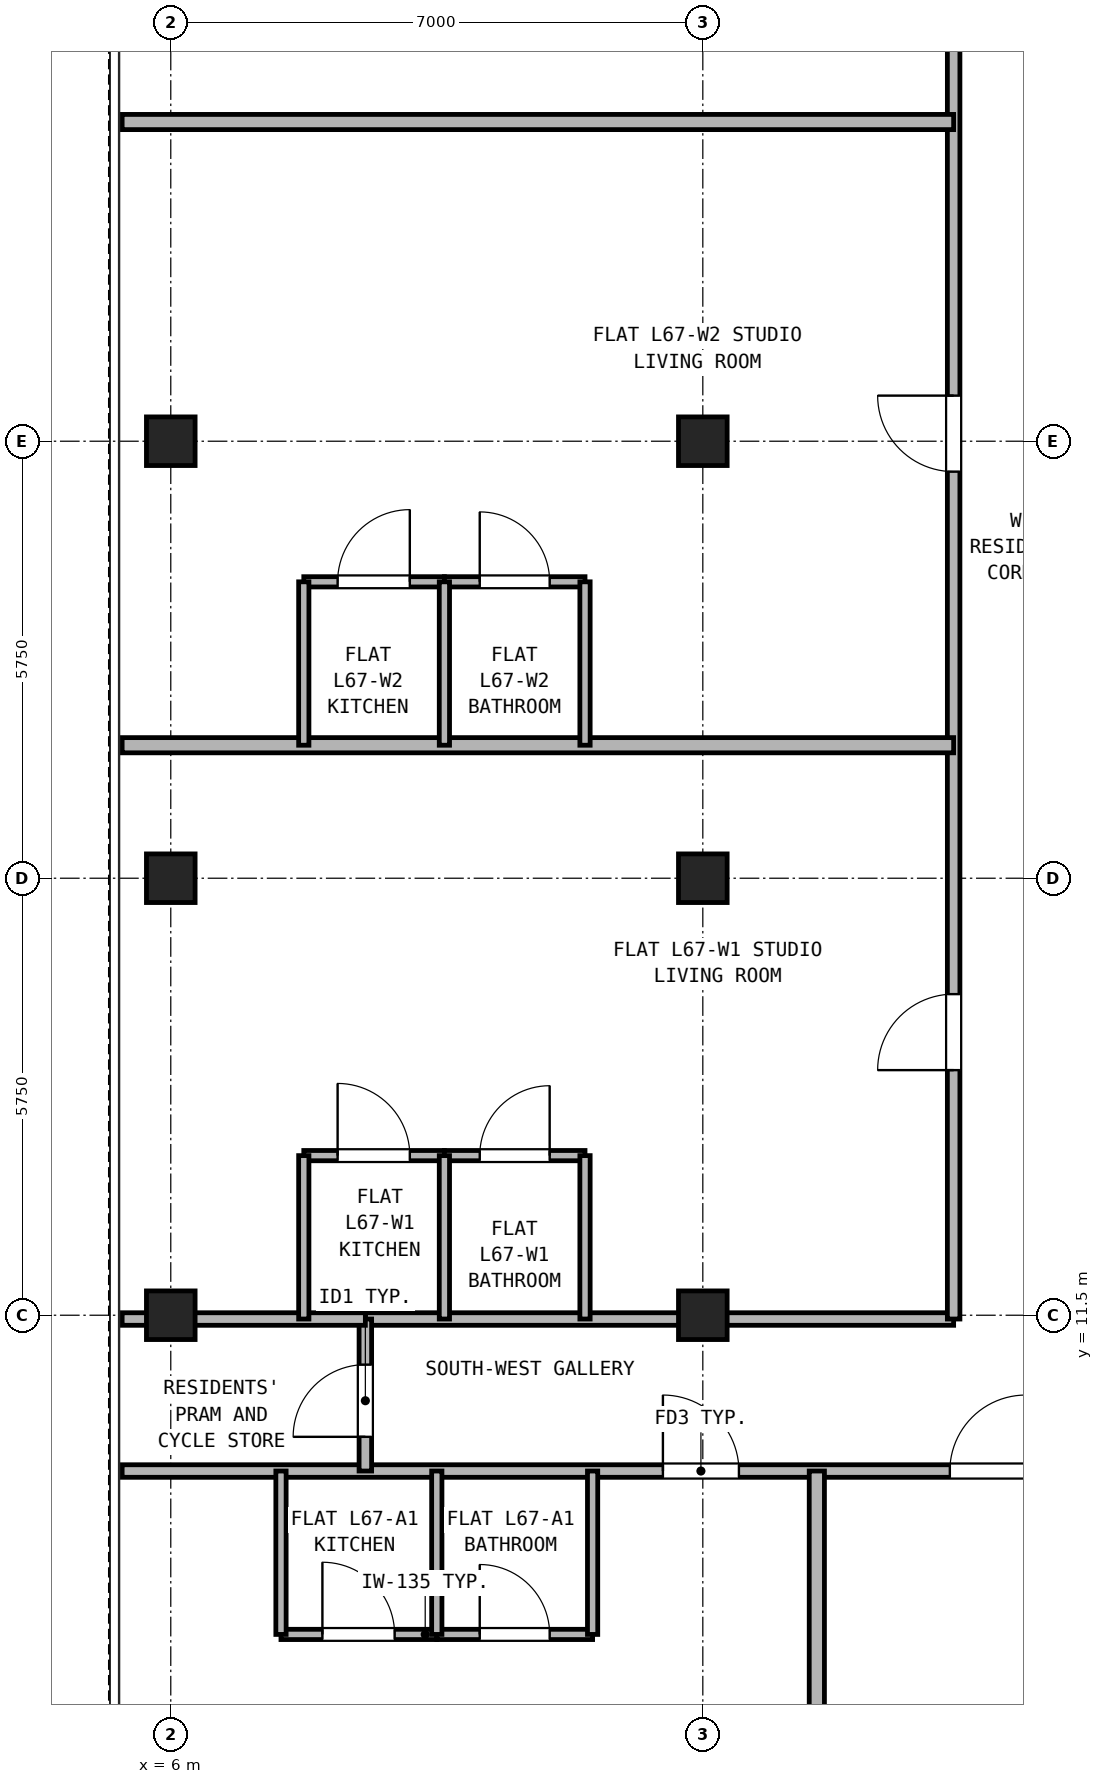
"""IFC4 building model, lengths in metres.
Left out: names, types, materials, properties, quantities, classifications, styles, units other than length and angle.
Written with IfcOpenShell. Run it as: python <this file> out.ifc"""

import sys

from ifc_helpers import new_model, si_unit, direction, frame, frame_2d, origin, origin_2d, place, context, subcontext, project, spatial, rectangle, hollow_rectangle, extrude, source, transform, mapped, element, fill, save


model = new_model("IFC4")
c1 = context("Model", 3, precision=1e-05, world=origin(), true_north=direction((0.0, 1.0)))
c2 = subcontext(c1, "Body", "Model", "MODEL_VIEW")
j1 = project(units=[si_unit("LENGTHUNIT", "METRE"), si_unit("PLANEANGLEUNIT", "RADIAN")], contexts=[c1])
p1 = place(None, origin())
s1 = spatial("IfcSite", under=j1, at=p1, CompositionType="ELEMENT")
p2 = place(p1, origin())
s2 = spatial("IfcBuilding", under=s1, at=p2, CompositionType="ELEMENT")
p3 = place(p2, frame((0.0, 0.0, 236.1)))
s3 = spatial("IfcBuildingStorey", under=s2, at=p3, CompositionType="ELEMENT", Elevation=236.1)
m1 = source(origin(), c2, "Body", "SweptSolid", [
    extrude(hollow_rectangle(XDim=0.64, YDim=0.64, WallThickness=0.035, at=origin_2d()), origin(), (0.0, 0.0, 1.0), 2.98),
])
for number, where, z_axis, x_axis in (
    (1, (6.0, 11.5, 0.0), (0.0, 0.0, 1.0), (1.0, 0.0, 0.0)),
    (2, (6.0, 17.25, 0.0), (0.0, 0.0, 1.0), (1.0, 0.0, 0.0)),
    (3, (6.0, 23.0, 0.0), (0.0, 0.0, 1.0), (1.0, 0.0, 0.0)),
    (4, (13.0, 11.5, 0.0), (0.0, 0.0, 1.0), (1.0, 0.0, 0.0)),
    (5, (13.0, 17.25, 0.0), (0.0, 0.0, 1.0), (1.0, 0.0, 0.0)),
    (6, (13.0, 23.0, 0.0), (0.0, 0.0, 1.0), (1.0, 0.0, 0.0)),
):
    element("IfcColumn", number, at=place(p3, frame(where, z_axis=z_axis, x_axis=x_axis)), inside=s3, PredefinedType="COLUMN", context=c2, shape_type="MappedRepresentation", body=[
        mapped(m1, transform((0.0, 0.0, 0.0), x_axis=(1.0, 0.0, 0.0), y_axis=(0.0, 1.0, 0.0), z_axis=(0.0, 0.0, 1.0), scale=1.0)),
    ])
p4 = place(p3, frame((5.36, 9.45, 0.0), z_axis=(0.0, 0.0, 1.0), x_axis=(1.0, 0.0, 0.0)))
e7 = element("IfcWall", 7, at=p4, inside=s3, PredefinedType="PARTITIONING", context=c2, shape_type="SweptSolid", body=[
    extrude(rectangle(XDim=36.28, YDim=0.165, at=frame_2d((18.14, 0.0))), origin(), (0.0, 0.0, 1.0), 2.98),
])
p5 = place(p4, frame((7.115, 0.0, 0.0)))
e8 = element("IfcOpeningElement", 8, at=p5, cuts=e7, PredefinedType="OPENING", context=c2, shape_type="SweptSolid", body=[
    extrude(rectangle(XDim=1.0, YDim=2.15, at=frame_2d((0.5, 1.075))), frame((0.0, 0.093, 0.0), z_axis=(0.0, -1.0, 0.0), x_axis=(1.0, 0.0, 0.0)), (0.0, 0.0, 1.0), 0.185),
])
p6 = place(p4, frame((10.89, 0.0, 0.0)))
e9 = element("IfcOpeningElement", 9, at=p6, cuts=e7, PredefinedType="OPENING", context=c2, shape_type="SweptSolid", body=[
    extrude(rectangle(XDim=1.0, YDim=2.15, at=frame_2d((0.5, 1.075))), frame((0.0, 0.093, 0.0), z_axis=(0.0, -1.0, 0.0), x_axis=(1.0, 0.0, 0.0)), (0.0, 0.0, 1.0), 0.185),
])
p7 = place(p4, frame((23.64, 0.0, 0.0)))
e10 = element("IfcOpeningElement", 10, at=p7, cuts=e7, PredefinedType="OPENING", context=c2, shape_type="SweptSolid", body=[
    extrude(rectangle(XDim=1.0, YDim=2.15, at=frame_2d((0.5, 1.075))), frame((0.0, 0.093, 0.0), z_axis=(0.0, -1.0, 0.0), x_axis=(1.0, 0.0, 0.0)), (0.0, 0.0, 1.0), 0.185),
])
p8 = place(p4, frame((27.915, 0.0, 0.0)))
e11 = element("IfcOpeningElement", 11, at=p8, cuts=e7, PredefinedType="OPENING", context=c2, shape_type="SweptSolid", body=[
    extrude(rectangle(XDim=1.0, YDim=2.15, at=frame_2d((0.5, 1.075))), frame((0.0, 0.093, 0.0), z_axis=(0.0, -1.0, 0.0), x_axis=(1.0, 0.0, 0.0)), (0.0, 0.0, 1.0), 0.185),
])
p9 = place(p3, frame((8.56, 11.45, 0.0), z_axis=(0.0, 0.0, 1.0), x_axis=(1.0, 0.0, 0.0)))
e12 = element("IfcWall", 12, at=p9, inside=s3, PredefinedType="PARTITIONING", context=c2, shape_type="SweptSolid", body=[
    extrude(rectangle(XDim=7.74, YDim=0.165, at=frame_2d((3.87, 0.0))), origin(), (0.0, 0.0, 1.0), 2.428),
])
p10 = place(p3, frame((8.56, 9.45, 0.0), z_axis=(0.0, 0.0, 1.0), x_axis=(0.0, 1.0, 0.0)))
e13 = element("IfcWall", 13, at=p10, inside=s3, PredefinedType="PARTITIONING", context=c2, shape_type="SweptSolid", body=[
    extrude(rectangle(XDim=2.0, YDim=0.165, at=frame_2d((1.0, 0.0))), origin(), (0.0, 0.0, 1.0), 2.98),
])
p11 = place(p10, frame((0.45, 0.0, 0.0)))
e14 = element("IfcOpeningElement", 14, at=p11, cuts=e13, PredefinedType="OPENING", context=c2, shape_type="SweptSolid", body=[
    extrude(rectangle(XDim=0.95, YDim=2.15, at=frame_2d((0.475, 1.075))), frame((0.0, 0.093, 0.0), z_axis=(0.0, -1.0, 0.0), x_axis=(1.0, 0.0, 0.0)), (0.0, 0.0, 1.0), 0.185),
])
p12 = place(p3, frame((16.3, 11.45, 0.0), z_axis=(0.0, 0.0, 1.0), x_axis=(0.0, 1.0, 0.0)))
e15 = element("IfcWall", 15, at=p12, inside=s3, PredefinedType="PARTITIONING", context=c2, shape_type="SweptSolid", body=[
    extrude(rectangle(XDim=23.69, YDim=0.165, at=frame_2d((11.845, 0.0))), origin(), (0.0, 0.0, 1.0), 2.98),
])
p13 = place(p12, frame((3.275, 0.0, 0.0)))
e16 = element("IfcOpeningElement", 16, at=p13, cuts=e15, PredefinedType="OPENING", context=c2, shape_type="SweptSolid", body=[
    extrude(rectangle(XDim=1.0, YDim=2.15, at=frame_2d((0.5, 1.075))), frame((0.0, 0.093, 0.0), z_axis=(0.0, -1.0, 0.0), x_axis=(1.0, 0.0, 0.0)), (0.0, 0.0, 1.0), 0.185),
])
p14 = place(p12, frame((11.15, 0.0, 0.0)))
e17 = element("IfcOpeningElement", 17, at=p14, cuts=e15, PredefinedType="OPENING", context=c2, shape_type="SweptSolid", body=[
    extrude(rectangle(XDim=1.0, YDim=2.15, at=frame_2d((0.5, 1.075))), frame((0.0, 0.093, 0.0), z_axis=(0.0, -1.0, 0.0), x_axis=(1.0, 0.0, 0.0)), (0.0, 0.0, 1.0), 0.185),
])
p15 = place(p12, frame((16.925, 0.0, 0.0)))
e18 = element("IfcOpeningElement", 18, at=p15, cuts=e15, PredefinedType="OPENING", context=c2, shape_type="SweptSolid", body=[
    extrude(rectangle(XDim=1.0, YDim=2.15, at=frame_2d((0.5, 1.075))), frame((0.0, 0.093, 0.0), z_axis=(0.0, -1.0, 0.0), x_axis=(1.0, 0.0, 0.0)), (0.0, 0.0, 1.0), 0.185),
])
p16 = place(p3, frame((7.45, 7.3, 0.0), z_axis=(0.0, 0.0, 1.0), x_axis=(1.0, 0.0, 0.0)))
e19 = element("IfcWall", 19, at=p16, inside=s3, PredefinedType="PARTITIONING", context=c2, shape_type="SweptSolid", body=[
    extrude(rectangle(XDim=2.05, YDim=0.135, at=frame_2d((1.025, 0.0))), origin(), (0.0, 0.0, 1.0), 2.98),
])
p17 = place(p16, frame((0.545, 0.0, 0.0)))
e20 = element("IfcOpeningElement", 20, at=p17, cuts=e19, PredefinedType="OPENING", context=c2, shape_type="SweptSolid", body=[
    extrude(rectangle(XDim=0.95, YDim=2.15, at=frame_2d((0.475, 1.075))), frame((0.0, 0.077, 0.0), z_axis=(0.0, -1.0, 0.0), x_axis=(1.0, 0.0, 0.0)), (0.0, 0.0, 1.0), 0.155),
])
p18 = place(p3, frame((9.5, 7.3, 0.0), z_axis=(0.0, 0.0, 1.0), x_axis=(1.0, 0.0, 0.0)))
e21 = element("IfcWall", 21, at=p18, inside=s3, PredefinedType="PARTITIONING", context=c2, shape_type="SweptSolid", body=[
    extrude(rectangle(XDim=2.05, YDim=0.135, at=frame_2d((1.025, 0.0))), origin(), (0.0, 0.0, 1.0), 2.98),
])
p19 = place(p18, frame((0.565, 0.0, 0.0)))
e22 = element("IfcOpeningElement", 22, at=p19, cuts=e21, PredefinedType="OPENING", context=c2, shape_type="SweptSolid", body=[
    extrude(rectangle(XDim=0.92, YDim=2.1, at=frame_2d((0.46, 1.05))), frame((0.0, 0.077, 0.0), z_axis=(0.0, -1.0, 0.0), x_axis=(1.0, 0.0, 0.0)), (0.0, 0.0, 1.0), 0.155),
])
for number, where, z_axis, x_axis in (
    (23, (7.45, 7.3, 0.0), (0.0, 0.0, 1.0), (0.0, 1.0, 0.0)),
    (24, (9.5, 7.3, 0.0), (0.0, 0.0, 1.0), (0.0, 1.0, 0.0)),
    (25, (11.55, 7.3, 0.0), (0.0, 0.0, 1.0), (0.0, 1.0, 0.0)),
):
    element("IfcWall", number, at=place(p3, frame(where, z_axis=z_axis, x_axis=x_axis)), inside=s3, PredefinedType="PARTITIONING", context=c2, shape_type="SweptSolid", body=[
        extrude(rectangle(XDim=2.15, YDim=0.135, at=frame_2d((1.075, 0.0))), origin(), (0.0, 0.0, 1.0), 2.98),
    ])
p20 = place(p3, frame((14.5, 0.16, 0.0), z_axis=(0.0, 0.0, 1.0), x_axis=(0.0, 1.0, 0.0)))
e26 = element("IfcWall", 26, at=p20, inside=s3, PredefinedType="PARTITIONING", context=c2, shape_type="SweptSolid", body=[
    extrude(rectangle(XDim=9.29, YDim=0.2, at=frame_2d((4.645, 0.0))), origin(), (0.0, 0.0, 1.0), 2.98),
])
p21 = place(p3, frame((5.36, 11.45, 0.0), z_axis=(0.0, 0.0, 1.0), x_axis=(1.0, 0.0, 0.0)))
e27 = element("IfcWall", 27, at=p21, inside=s3, PredefinedType="PARTITIONING", context=c2, shape_type="SweptSolid", body=[
    extrude(rectangle(XDim=3.2, YDim=0.165, at=frame_2d((1.6, 0.0))), origin(), (0.0, 0.0, 1.0), 2.428),
])
p22 = place(p3, frame((7.75, 13.6, 0.0), z_axis=(0.0, 0.0, 1.0), x_axis=(1.0, 0.0, 0.0)))
e28 = element("IfcWall", 28, at=p22, inside=s3, PredefinedType="PARTITIONING", context=c2, shape_type="SweptSolid", body=[
    extrude(rectangle(XDim=1.85, YDim=0.135, at=frame_2d((0.925, 0.0))), origin(), (0.0, 0.0, 1.0), 2.98),
])
p23 = place(p22, frame((0.445, 0.0, 0.0)))
e29 = element("IfcOpeningElement", 29, at=p23, cuts=e28, PredefinedType="OPENING", context=c2, shape_type="SweptSolid", body=[
    extrude(rectangle(XDim=0.95, YDim=2.15, at=frame_2d((0.475, 1.075))), frame((0.0, 0.077, 0.0), z_axis=(0.0, -1.0, 0.0), x_axis=(1.0, 0.0, 0.0)), (0.0, 0.0, 1.0), 0.155),
])
p24 = place(p3, frame((9.6, 13.6, 0.0), z_axis=(0.0, 0.0, 1.0), x_axis=(1.0, 0.0, 0.0)))
e30 = element("IfcWall", 30, at=p24, inside=s3, PredefinedType="PARTITIONING", context=c2, shape_type="SweptSolid", body=[
    extrude(rectangle(XDim=1.85, YDim=0.135, at=frame_2d((0.925, 0.0))), origin(), (0.0, 0.0, 1.0), 2.98),
])
p25 = place(p24, frame((0.465, 0.0, 0.0)))
e31 = element("IfcOpeningElement", 31, at=p25, cuts=e30, PredefinedType="OPENING", context=c2, shape_type="SweptSolid", body=[
    extrude(rectangle(XDim=0.92, YDim=2.1, at=frame_2d((0.46, 1.05))), frame((0.0, 0.077, 0.0), z_axis=(0.0, -1.0, 0.0), x_axis=(1.0, 0.0, 0.0)), (0.0, 0.0, 1.0), 0.155),
])
for number, where, z_axis, x_axis in (
    (32, (7.75, 11.45, 0.0), (0.0, 0.0, 1.0), (0.0, 1.0, 0.0)),
    (33, (9.6, 11.45, 0.0), (0.0, 0.0, 1.0), (0.0, 1.0, 0.0)),
    (34, (11.45, 11.45, 0.0), (0.0, 0.0, 1.0), (0.0, 1.0, 0.0)),
):
    element("IfcWall", number, at=place(p3, frame(where, z_axis=z_axis, x_axis=x_axis)), inside=s3, PredefinedType="PARTITIONING", context=c2, shape_type="SweptSolid", body=[
        extrude(rectangle(XDim=2.15, YDim=0.135, at=frame_2d((1.075, 0.0))), origin(), (0.0, 0.0, 1.0), 2.98),
    ])
p26 = place(p3, frame((5.36, 19.0, 0.0), z_axis=(0.0, 0.0, 1.0), x_axis=(1.0, 0.0, 0.0)))
e35 = element("IfcWall", 35, at=p26, inside=s3, PredefinedType="PARTITIONING", context=c2, shape_type="SweptSolid", body=[
    extrude(rectangle(XDim=10.94, YDim=0.2, at=frame_2d((5.47, 0.0))), origin(), (0.0, 0.0, 1.0), 2.98),
])
p27 = place(p3, frame((7.75, 21.15, 0.0), z_axis=(0.0, 0.0, 1.0), x_axis=(1.0, 0.0, 0.0)))
e36 = element("IfcWall", 36, at=p27, inside=s3, PredefinedType="PARTITIONING", context=c2, shape_type="SweptSolid", body=[
    extrude(rectangle(XDim=1.85, YDim=0.135, at=frame_2d((0.925, 0.0))), origin(), (0.0, 0.0, 1.0), 2.98),
])
p28 = place(p27, frame((0.445, 0.0, 0.0)))
e37 = element("IfcOpeningElement", 37, at=p28, cuts=e36, PredefinedType="OPENING", context=c2, shape_type="SweptSolid", body=[
    extrude(rectangle(XDim=0.95, YDim=2.15, at=frame_2d((0.475, 1.075))), frame((0.0, 0.077, 0.0), z_axis=(0.0, -1.0, 0.0), x_axis=(1.0, 0.0, 0.0)), (0.0, 0.0, 1.0), 0.155),
])
p29 = place(p3, frame((9.6, 21.15, 0.0), z_axis=(0.0, 0.0, 1.0), x_axis=(1.0, 0.0, 0.0)))
e38 = element("IfcWall", 38, at=p29, inside=s3, PredefinedType="PARTITIONING", context=c2, shape_type="SweptSolid", body=[
    extrude(rectangle(XDim=1.85, YDim=0.135, at=frame_2d((0.925, 0.0))), origin(), (0.0, 0.0, 1.0), 2.98),
])
p30 = place(p29, frame((0.465, 0.0, 0.0)))
e39 = element("IfcOpeningElement", 39, at=p30, cuts=e38, PredefinedType="OPENING", context=c2, shape_type="SweptSolid", body=[
    extrude(rectangle(XDim=0.92, YDim=2.1, at=frame_2d((0.46, 1.05))), frame((0.0, 0.077, 0.0), z_axis=(0.0, -1.0, 0.0), x_axis=(1.0, 0.0, 0.0)), (0.0, 0.0, 1.0), 0.155),
])
for number, where, z_axis, x_axis in (
    (40, (7.75, 19.0, 0.0), (0.0, 0.0, 1.0), (0.0, 1.0, 0.0)),
    (41, (9.6, 19.0, 0.0), (0.0, 0.0, 1.0), (0.0, 1.0, 0.0)),
    (42, (11.45, 19.0, 0.0), (0.0, 0.0, 1.0), (0.0, 1.0, 0.0)),
):
    element("IfcWall", number, at=place(p3, frame(where, z_axis=z_axis, x_axis=x_axis)), inside=s3, PredefinedType="PARTITIONING", context=c2, shape_type="SweptSolid", body=[
        extrude(rectangle(XDim=2.15, YDim=0.135, at=frame_2d((1.075, 0.0))), origin(), (0.0, 0.0, 1.0), 2.98),
    ])
p31 = place(p3, frame((5.36, 27.2, 0.0), z_axis=(0.0, 0.0, 1.0), x_axis=(1.0, 0.0, 0.0)))
e43 = element("IfcWall", 43, at=p31, inside=s3, PredefinedType="PARTITIONING", context=c2, shape_type="SweptSolid", body=[
    extrude(rectangle(XDim=10.94, YDim=0.2, at=frame_2d((5.47, 0.0))), origin(), (0.0, 0.0, 1.0), 2.98),
])
p32 = place(p17, origin())
e44 = element("IfcDoor", 44, at=p32, inside=s3, OperationType="SINGLE_SWING_LEFT", PredefinedType="DOOR", context=c2, shape_type="SweptSolid", body=[
    extrude(rectangle(XDim=0.95, YDim=2.15, at=frame_2d((0.475, 1.075))), frame((0.0, 0.025, 0.0), z_axis=(0.0, -1.0, 0.0), x_axis=(1.0, 0.0, 0.0)), (0.0, 0.0, 1.0), 0.05),
])
fill(e20, e44)
p33 = place(p19, origin())
e45 = element("IfcDoor", 45, at=p33, inside=s3, OperationType="SINGLE_SWING_LEFT", PredefinedType="DOOR", context=c2, shape_type="SweptSolid", body=[
    extrude(rectangle(XDim=0.92, YDim=2.1, at=frame_2d((0.46, 1.05))), frame((0.0, 0.025, 0.0), z_axis=(0.0, -1.0, 0.0), x_axis=(1.0, 0.0, 0.0)), (0.0, 0.0, 1.0), 0.05),
])
fill(e22, e45)
p34 = place(p5, frame((1.0, 0.0, 0.0), z_axis=(0.0, 0.0, 1.0), x_axis=(-1.0, 0.0, 0.0)))
e46 = element("IfcDoor", 46, at=p34, inside=s3, OperationType="SINGLE_SWING_LEFT", PredefinedType="DOOR", context=c2, shape_type="SweptSolid", body=[
    extrude(rectangle(XDim=1.0, YDim=2.15, at=frame_2d((0.5, 1.075))), frame((0.0, 0.025, 0.0), z_axis=(0.0, -1.0, 0.0), x_axis=(1.0, 0.0, 0.0)), (0.0, 0.0, 1.0), 0.05),
])
fill(e8, e46)
p35 = place(p6, frame((1.0, 0.0, 0.0), z_axis=(0.0, 0.0, 1.0), x_axis=(-1.0, 0.0, 0.0)))
e47 = element("IfcDoor", 47, at=p35, inside=s3, OperationType="SINGLE_SWING_RIGHT", PredefinedType="DOOR", context=c2, shape_type="SweptSolid", body=[
    extrude(rectangle(XDim=1.0, YDim=2.15, at=frame_2d((0.5, 1.075))), frame((0.0, 0.025, 0.0), z_axis=(0.0, -1.0, 0.0), x_axis=(1.0, 0.0, 0.0)), (0.0, 0.0, 1.0), 0.05),
])
fill(e9, e47)
p36 = place(p11, frame((0.95, 0.0, 0.0), z_axis=(0.0, 0.0, 1.0), x_axis=(-1.0, 0.0, 0.0)))
e48 = element("IfcDoor", 48, at=p36, inside=s3, OperationType="SINGLE_SWING_LEFT", PredefinedType="DOOR", context=c2, shape_type="SweptSolid", body=[
    extrude(rectangle(XDim=0.95, YDim=2.15, at=frame_2d((0.475, 1.075))), frame((0.0, 0.025, 0.0), z_axis=(0.0, -1.0, 0.0), x_axis=(1.0, 0.0, 0.0)), (0.0, 0.0, 1.0), 0.05),
])
fill(e14, e48)
p37 = place(p23, origin())
e49 = element("IfcDoor", 49, at=p37, inside=s3, OperationType="SINGLE_SWING_LEFT", PredefinedType="DOOR", context=c2, shape_type="SweptSolid", body=[
    extrude(rectangle(XDim=0.95, YDim=2.15, at=frame_2d((0.475, 1.075))), frame((0.0, 0.025, 0.0), z_axis=(0.0, -1.0, 0.0), x_axis=(1.0, 0.0, 0.0)), (0.0, 0.0, 1.0), 0.05),
])
fill(e29, e49)
p38 = place(p25, origin())
e50 = element("IfcDoor", 50, at=p38, inside=s3, OperationType="SINGLE_SWING_RIGHT", PredefinedType="DOOR", context=c2, shape_type="SweptSolid", body=[
    extrude(rectangle(XDim=0.92, YDim=2.1, at=frame_2d((0.46, 1.05))), frame((0.0, 0.025, 0.0), z_axis=(0.0, -1.0, 0.0), x_axis=(1.0, 0.0, 0.0)), (0.0, 0.0, 1.0), 0.05),
])
fill(e31, e50)
p39 = place(p13, origin())
e51 = element("IfcDoor", 51, at=p39, inside=s3, OperationType="SINGLE_SWING_LEFT", PredefinedType="DOOR", context=c2, shape_type="SweptSolid", body=[
    extrude(rectangle(XDim=1.0, YDim=2.15, at=frame_2d((0.5, 1.075))), frame((0.0, 0.025, 0.0), z_axis=(0.0, -1.0, 0.0), x_axis=(1.0, 0.0, 0.0)), (0.0, 0.0, 1.0), 0.05),
])
fill(e16, e51)
p40 = place(p28, origin())
e52 = element("IfcDoor", 52, at=p40, inside=s3, OperationType="SINGLE_SWING_RIGHT", PredefinedType="DOOR", context=c2, shape_type="SweptSolid", body=[
    extrude(rectangle(XDim=0.95, YDim=2.15, at=frame_2d((0.475, 1.075))), frame((0.0, 0.025, 0.0), z_axis=(0.0, -1.0, 0.0), x_axis=(1.0, 0.0, 0.0)), (0.0, 0.0, 1.0), 0.05),
])
fill(e37, e52)
p41 = place(p30, origin())
e53 = element("IfcDoor", 53, at=p41, inside=s3, OperationType="SINGLE_SWING_LEFT", PredefinedType="DOOR", context=c2, shape_type="SweptSolid", body=[
    extrude(rectangle(XDim=0.92, YDim=2.1, at=frame_2d((0.46, 1.05))), frame((0.0, 0.025, 0.0), z_axis=(0.0, -1.0, 0.0), x_axis=(1.0, 0.0, 0.0)), (0.0, 0.0, 1.0), 0.05),
])
fill(e39, e53)
p42 = place(p14, origin())
e54 = element("IfcDoor", 54, at=p42, inside=s3, OperationType="SINGLE_SWING_RIGHT", PredefinedType="DOOR", context=c2, shape_type="SweptSolid", body=[
    extrude(rectangle(XDim=1.0, YDim=2.15, at=frame_2d((0.5, 1.075))), frame((0.0, 0.025, 0.0), z_axis=(0.0, -1.0, 0.0), x_axis=(1.0, 0.0, 0.0)), (0.0, 0.0, 1.0), 0.05),
])
fill(e17, e54)
save(model, sys.argv[1])
